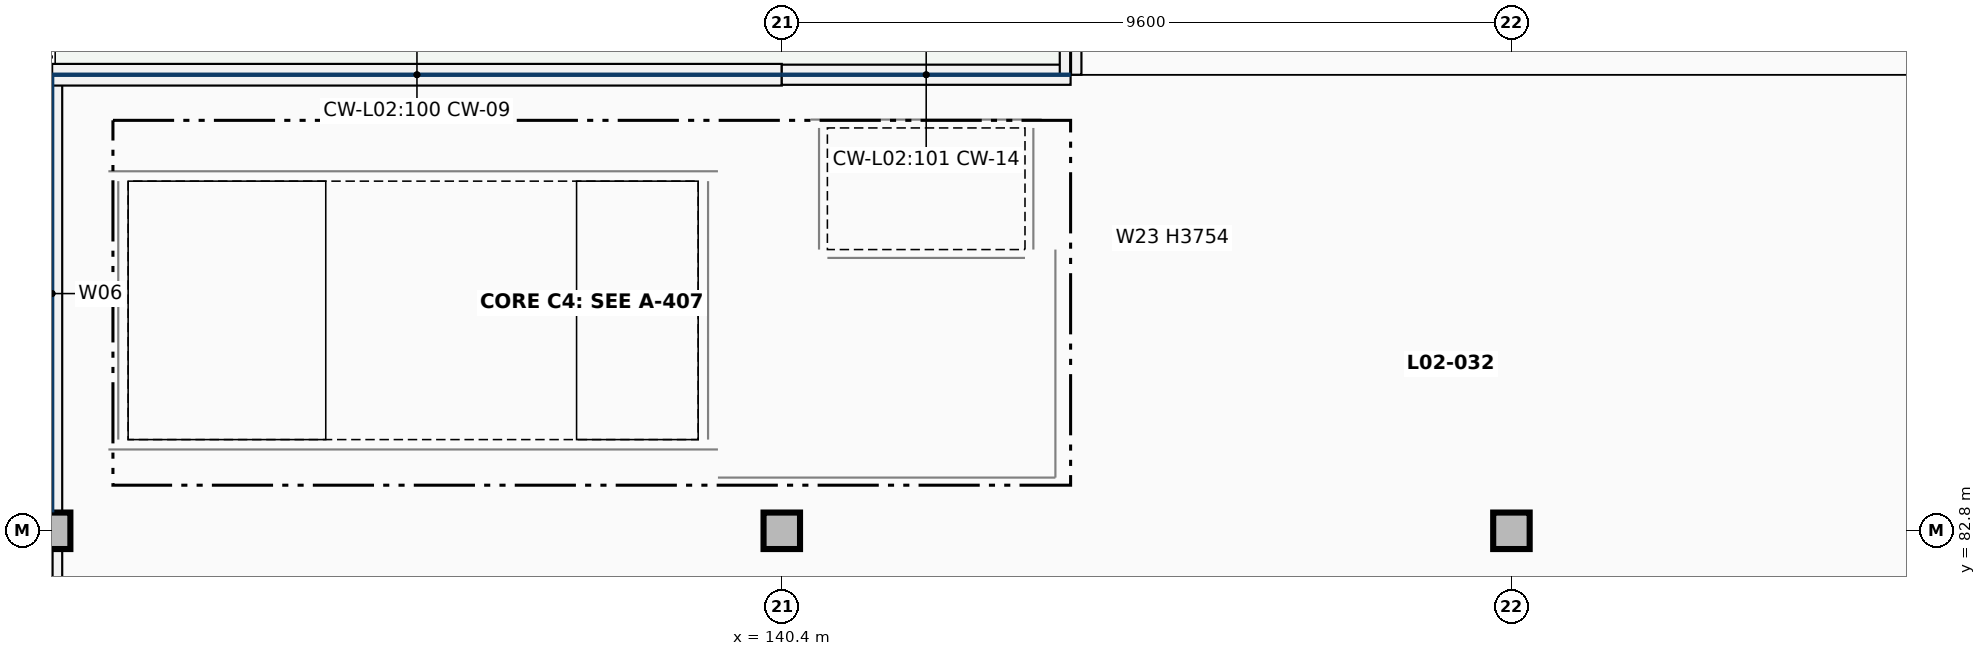
"""IFC4 building model, lengths in metres.
Left out: names, types, materials, properties, quantities, classifications, styles, units other than length and angle.
Written with IfcOpenShell. Run it as: python <this file> out.ifc"""

import sys

from ifc_helpers import new_model, si_unit, direction, frame, frame_2d, origin, origin_2d, place, context, subcontext, project, spatial, rectangle, extrude, element, fill, save


model = new_model("IFC4")
c1 = context("Model", 3, precision=1e-05, world=origin(), true_north=direction((0.0, 1.0)))
c2 = subcontext(c1, "Body", "Model", "MODEL_VIEW")
j1 = project(units=[si_unit("LENGTHUNIT", "METRE"), si_unit("PLANEANGLEUNIT", "RADIAN")], contexts=[c1])
p1 = place(None, origin())
s1 = spatial("IfcSite", under=j1, at=p1, CompositionType="ELEMENT")
p2 = place(p1, origin())
s2 = spatial("IfcBuilding", under=s1, at=p2, CompositionType="ELEMENT")
p3 = place(p2, frame((0.0, 0.0, 9.52)))
s3 = spatial("IfcBuildingStorey", under=s2, at=p3, CompositionType="ELEMENT", Elevation=9.52)
for number, where, z_axis, x_axis in (
    (1, (130.8, 82.8, 0.0), (0.0, 0.0, 1.0), (1.0, 0.0, 0.0)),
    (2, (140.4, 82.8, 0.0), (0.0, 0.0, 1.0), (1.0, 0.0, 0.0)),
    (3, (150.0, 82.8, 0.0), (0.0, 0.0, 1.0), (1.0, 0.0, 0.0)),
):
    element("IfcColumn", number, at=place(p3, frame(where, z_axis=z_axis, x_axis=x_axis)), inside=s3, PredefinedType="COLUMN", context=c2, shape_type="SweptSolid", body=[
        extrude(rectangle(XDim=0.48, YDim=0.48, at=origin_2d()), origin(), (0.0, 0.0, 1.0), 4.08),
    ])
p4 = place(p3, frame((130.8, 79.442, 0.0), z_axis=(0.0, 0.0, 1.0), x_axis=(0.0, 1.0, 0.0)))
e4 = element("IfcWall", 4, at=p4, inside=s3, PredefinedType="SOLIDWALL", context=c2, shape_type="SweptSolid", body=[
    extrude(rectangle(XDim=3.116, YDim=0.265, at=frame_2d((1.558, 0.0))), origin(), (0.0, 0.0, 1.0), 2.979),
])
p5 = place(p3, frame((130.8, 83.042, 0.0), z_axis=(0.0, 0.0, 1.0), x_axis=(0.0, 1.0, 0.0)))
e5 = element("IfcWall", 5, at=p5, inside=s3, PredefinedType="SOLIDWALL", context=c2, shape_type="SweptSolid", body=[
    extrude(rectangle(XDim=5.758, YDim=0.265, at=frame_2d((2.879, 0.0))), origin(), (0.0, 0.0, 1.0), 0.85),
])
p6 = place(p3, frame((130.8, 88.8, 0.0), z_axis=(0.0, 0.0, 1.0), x_axis=(1.0, 0.0, 0.0)))
e6 = element("IfcWall", 6, at=p6, inside=s3, PredefinedType="SOLIDWALL", context=c2, shape_type="SweptSolid", body=[
    extrude(rectangle(XDim=9.6, YDim=0.285, at=frame_2d((4.8, 0.0))), origin(), (0.0, 0.0, 1.0), 0.85),
])
p7 = place(p3, frame((140.4, 88.8, 0.0), z_axis=(0.0, 0.0, 1.0), x_axis=(1.0, 0.0, 0.0)))
e7 = element("IfcWall", 7, at=p7, inside=s3, PredefinedType="SOLIDWALL", context=c2, shape_type="SweptSolid", body=[
    extrude(rectangle(XDim=3.8, YDim=0.265, at=frame_2d((1.9, 0.0))), origin(), (0.0, 0.0, 1.0), 0.85),
])
p8 = place(p3, frame((144.2, 88.8, 0.0), z_axis=(0.0, 0.0, 1.0), x_axis=(0.0, 1.0, 0.0)))
e8 = element("IfcWall", 8, at=p8, inside=s3, PredefinedType="SOLIDWALL", context=c2, shape_type="SweptSolid", body=[
    extrude(rectangle(XDim=1.2, YDim=0.285, at=frame_2d((0.6, 0.0))), origin(), (0.0, 0.0, 1.0), 3.774),
])
p9 = place(p3, frame((131.67, 84.0, 0.0), z_axis=(0.0, 0.0, 1.0), x_axis=(0.0, 1.0, 0.0)))
e9 = element("IfcWall", 9, at=p9, inside=s3, PredefinedType="SHEAR", context=c2, shape_type="SweptSolid", body=[
    extrude(rectangle(XDim=3.4, YDim=0.26, at=frame_2d((1.7, 0.0))), origin(), (0.0, 0.0, 1.0), 4.08),
])
for number, where, z_axis, x_axis in (
    (10, (131.54, 83.87, 0.0), (0.0, 0.0, 1.0), (1.0, 0.0, 0.0)),
    (11, (131.54, 87.53, 0.0), (0.0, 0.0, 1.0), (1.0, 0.0, 0.0)),
):
    element("IfcWall", number, at=place(p3, frame(where, z_axis=z_axis, x_axis=x_axis)), inside=s3, PredefinedType="SHEAR", context=c2, shape_type="SweptSolid", body=[
        extrude(rectangle(XDim=8.02, YDim=0.26, at=frame_2d((4.01, 0.0))), origin(), (0.0, 0.0, 1.0), 4.08),
    ])
p10 = place(p3, frame((139.43, 84.0, 0.0), z_axis=(0.0, 0.0, 1.0), x_axis=(0.0, 1.0, 0.0)))
e12 = element("IfcWall", 12, at=p10, inside=s3, PredefinedType="SHEAR", context=c2, shape_type="SweptSolid", body=[
    extrude(rectangle(XDim=3.4, YDim=0.26, at=frame_2d((1.7, 0.0))), origin(), (0.0, 0.0, 1.0), 4.08),
])
p11 = place(p10, frame((0.65, 0.0, 0.0)))
e13 = element("IfcOpeningElement", 13, at=p11, cuts=e12, PredefinedType="OPENING", context=c2, shape_type="SweptSolid", body=[
    extrude(rectangle(XDim=1.2, YDim=2.2, at=frame_2d((0.6, 1.1))), frame((0.0, 0.14, 0.0), z_axis=(0.0, -1.0, 0.0), x_axis=(1.0, 0.0, 0.0)), (0.0, 0.0, 1.0), 0.28),
])
for number, where, z_axis, x_axis in (
    (14, (140.89, 86.5, 0.0), (0.0, 0.0, 1.0), (0.0, 1.0, 0.0)),
    (15, (143.71, 86.5, 0.0), (0.0, 0.0, 1.0), (0.0, 1.0, 0.0)),
):
    element("IfcWall", number, at=place(p3, frame(where, z_axis=z_axis, x_axis=x_axis)), inside=s3, PredefinedType="SHEAR", context=c2, shape_type="SweptSolid", body=[
        extrude(rectangle(XDim=1.6, YDim=0.22, at=frame_2d((0.8, 0.0))), origin(), (0.0, 0.0, 1.0), 4.08),
    ])
p12 = place(p3, frame((140.78, 88.21, 0.0), z_axis=(0.0, 0.0, 1.0), x_axis=(1.0, 0.0, 0.0)))
e16 = element("IfcWall", 16, at=p12, inside=s3, PredefinedType="SHEAR", context=c2, shape_type="SweptSolid", body=[
    extrude(rectangle(XDim=3.04, YDim=0.22, at=frame_2d((1.52, 0.0))), origin(), (0.0, 0.0, 1.0), 4.08),
])
p13 = place(p3, frame((141.0, 86.39, 0.0), z_axis=(0.0, 0.0, 1.0), x_axis=(1.0, 0.0, 0.0)))
e17 = element("IfcWall", 17, at=p13, inside=s3, PredefinedType="SHEAR", context=c2, shape_type="SweptSolid", body=[
    extrude(rectangle(XDim=2.6, YDim=0.22, at=frame_2d((1.3, 0.0))), origin(), (0.0, 0.0, 1.0), 4.08),
])
p14 = place(p13, frame((0.8, 0.0, 0.0)))
e18 = element("IfcOpeningElement", 18, at=p14, cuts=e17, PredefinedType="OPENING", context=c2, shape_type="SweptSolid", body=[
    extrude(rectangle(XDim=1.0, YDim=2.15, at=frame_2d((0.5, 1.075))), frame((0.0, 0.12, 0.0), z_axis=(0.0, -1.0, 0.0), x_axis=(1.0, 0.0, 0.0)), (0.0, 0.0, 1.0), 0.24),
])
p15 = place(p3, frame((144.0, 83.5, 0.0), z_axis=(0.0, 0.0, 1.0), x_axis=(0.0, 1.0, 0.0)))
e19 = element("IfcWall", 19, at=p15, inside=s3, PredefinedType="PARTITIONING", context=c2, shape_type="SweptSolid", body=[
    extrude(rectangle(XDim=3.0, YDim=0.2, at=frame_2d((1.5, 0.0))), origin(), (0.0, 0.0, 1.0), 3.754),
])
p16 = place(p15, frame((0.775, 0.0, 0.0)))
e20 = element("IfcOpeningElement", 20, at=p16, cuts=e19, PredefinedType="OPENING", context=c2, shape_type="SweptSolid", body=[
    extrude(rectangle(XDim=1.45, YDim=2.2, at=frame_2d((0.725, 1.1))), frame((0.0, 0.11, 0.0), z_axis=(0.0, -1.0, 0.0), x_axis=(1.0, 0.0, 0.0)), (0.0, 0.0, 1.0), 0.22),
])
p17 = place(p3, frame((139.56, 83.5, 0.0), z_axis=(0.0, 0.0, 1.0), x_axis=(1.0, 0.0, 0.0)))
e21 = element("IfcWall", 21, at=p17, inside=s3, PredefinedType="PARTITIONING", context=c2, shape_type="SweptSolid", body=[
    extrude(rectangle(XDim=4.44, YDim=0.2, at=frame_2d((2.22, 0.0))), origin(), (0.0, 0.0, 1.0), 3.754),
])
p18 = place(p11, origin())
e22 = element("IfcDoor", 22, at=p18, inside=s3, OperationType="SINGLE_SWING_RIGHT", PredefinedType="DOOR", context=c2, shape_type="SweptSolid", body=[
    extrude(rectangle(XDim=1.2, YDim=2.2, at=frame_2d((0.6, 1.1))), frame((0.0, 0.025, 0.0), z_axis=(0.0, -1.0, 0.0), x_axis=(1.0, 0.0, 0.0)), (0.0, 0.0, 1.0), 0.05),
])
fill(e13, e22)
p19 = place(p14, origin())
e23 = element("IfcDoor", 23, at=p19, inside=s3, OperationType="DOUBLE_DOOR_SLIDING", PredefinedType="DOOR", context=c2, shape_type="SweptSolid", body=[
    extrude(rectangle(XDim=1.0, YDim=2.15, at=frame_2d((0.5, 1.075))), frame((0.0, 0.025, 0.0), z_axis=(0.0, -1.0, 0.0), x_axis=(1.0, 0.0, 0.0)), (0.0, 0.0, 1.0), 0.05),
])
fill(e18, e23)
p20 = place(p16, frame((1.45, 0.0, 0.0), z_axis=(0.0, 0.0, 1.0), x_axis=(-1.0, 0.0, 0.0)))
e24 = element("IfcDoor", 24, at=p20, inside=s3, OperationType="DOUBLE_DOOR_SINGLE_SWING", PredefinedType="DOOR", context=c2, shape_type="SweptSolid", body=[
    extrude(rectangle(XDim=1.45, YDim=2.2, at=frame_2d((0.725, 1.1))), frame((0.0, 0.025, 0.0), z_axis=(0.0, -1.0, 0.0), x_axis=(1.0, 0.0, 0.0)), (0.0, 0.0, 1.0), 0.05),
])
fill(e20, e24)
save(model, sys.argv[1])
